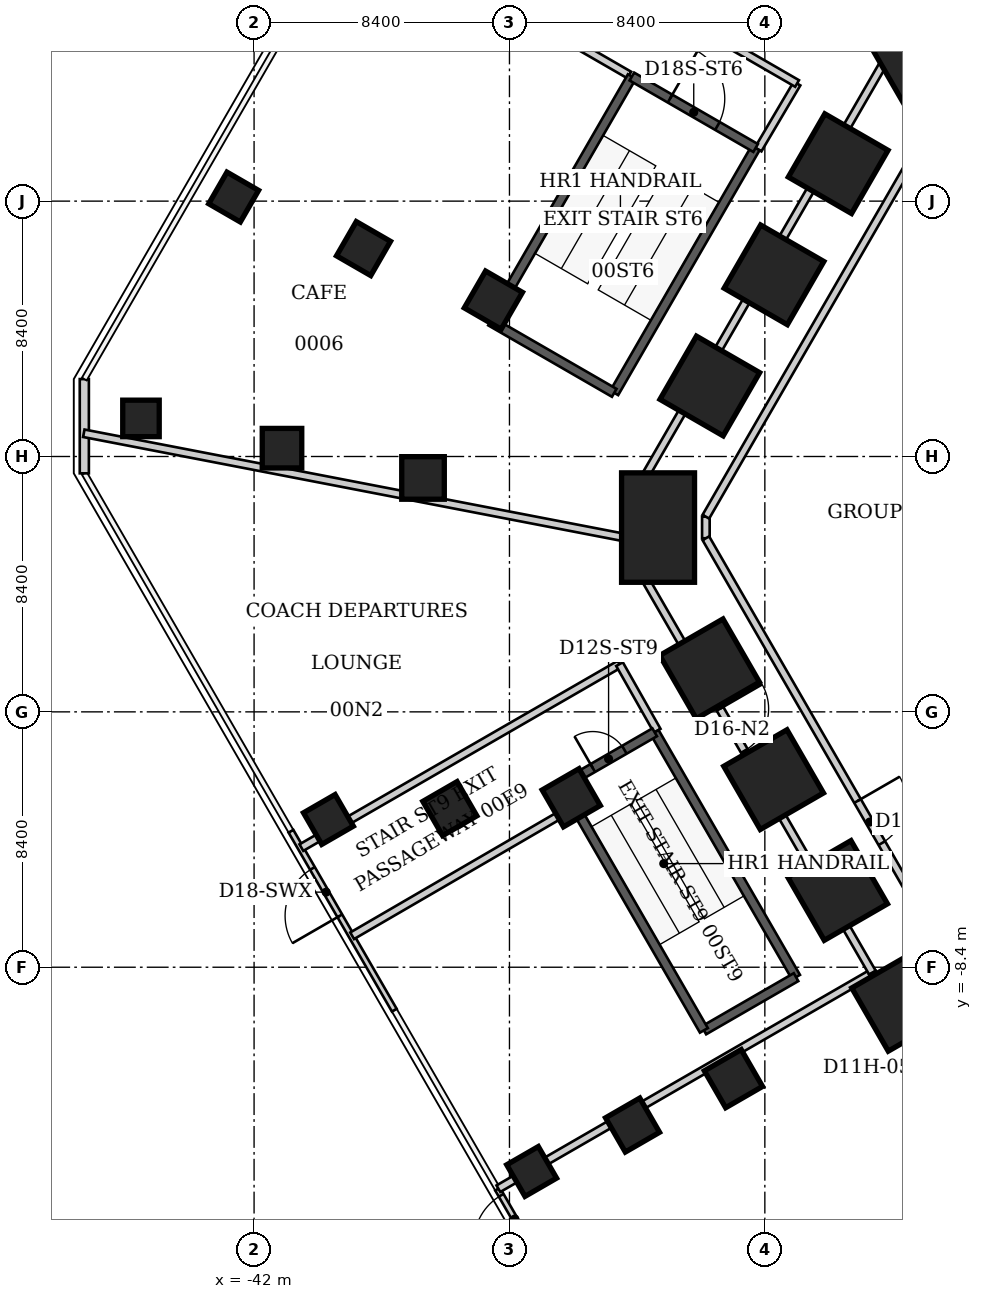
"""IFC4 building model, lengths in metres.
Left out: names, types, materials, properties, quantities, classifications, styles, units other than length and angle.
Written with IfcOpenShell. Run it as: python <this file> out.ifc"""

import sys

from ifc_helpers import new_model, si_unit, direction, frame, frame_2d, origin, origin_2d, place, context, subcontext, project, spatial, rectangle, extrude, element, fill, save


model = new_model("IFC4")
c1 = context("Model", 3, precision=1e-05, world=origin(), true_north=direction((0.0, 1.0)))
c2 = subcontext(c1, "Body", "Model", "MODEL_VIEW")
j1 = project(units=[si_unit("LENGTHUNIT", "METRE"), si_unit("PLANEANGLEUNIT", "RADIAN")], contexts=[c1])
p1 = place(None, origin())
s1 = spatial("IfcSite", under=j1, at=p1, CompositionType="ELEMENT")
p2 = place(p1, origin())
s2 = spatial("IfcBuilding", under=s1, at=p2, CompositionType="ELEMENT")
p3 = place(p2, origin())
s3 = spatial("IfcBuildingStorey", under=s2, at=p3, CompositionType="ELEMENT", Elevation=0.0)
for number, where, z_axis, x_axis in (
    (1, (-20.701, -9.521, -0.2), (0.0, 0.0, 1.0), (-0.866, -0.5, 0.0)),
    (2, (-22.806, -5.875, -0.2), (0.0, 0.0, 1.0), (-0.866, -0.5, 0.0)),
    (3, (-24.911, -2.23, -0.2), (0.0, 0.0, 1.0), (-0.866, -0.5, 0.0)),
    (4, (-27.016, 1.416, -0.2), (0.0, 0.0, 1.0), (-0.866, -0.5, 0.0)),
):
    element("IfcColumn", number, at=place(p3, frame(where, z_axis=z_axis, x_axis=x_axis)), inside=s3, PredefinedType="COLUMN", context=c2, shape_type="SweptSolid", body=[
        extrude(rectangle(XDim=2.4, YDim=2.4, at=origin_2d()), origin(), (0.0, 0.0, 1.0), 6.2),
    ])
p4 = place(p3, frame((-28.713, 6.062, -0.2), z_axis=(0.0, 0.0, 1.0), x_axis=(-1.0, 0.0, 0.0)))
e5 = element("IfcColumn", 5, at=p4, inside=s3, PredefinedType="COLUMN", context=c2, shape_type="SweptSolid", body=[
    extrude(rectangle(XDim=2.4, YDim=3.6, at=origin_2d()), origin(), (0.0, 0.0, 1.0), 6.2),
])
for number, where, z_axis, x_axis in (
    (6, (-27.01, 10.719, -0.2), (0.0, 0.0, 1.0), (-0.866, 0.5, 0.0)),
    (7, (-24.899, 14.375, -0.2), (0.0, 0.0, 1.0), (-0.866, 0.5, 0.0)),
    (8, (-22.788, 18.032, -0.2), (0.0, 0.0, 1.0), (-0.866, 0.5, 0.0)),
):
    element("IfcColumn", number, at=place(p3, frame(where, z_axis=z_axis, x_axis=x_axis)), inside=s3, PredefinedType="COLUMN", context=c2, shape_type="SweptSolid", body=[
        extrude(rectangle(XDim=2.4, YDim=2.4, at=origin_2d()), origin(), (0.0, 0.0, 1.0), 6.2),
    ])
p5 = place(p3, frame((-19.606, 21.835, -0.2), z_axis=(0.0, 0.0, 1.0), x_axis=(-0.5, 0.866025403784, 0.0)))
e9 = element("IfcColumn", 9, at=p5, inside=s3, PredefinedType="COLUMN", context=c2, shape_type="SweptSolid", body=[
    extrude(rectangle(XDim=2.4, YDim=3.6, at=origin_2d()), origin(), (0.0, 0.0, 1.0), 6.2),
])
for number, where, z_axis, x_axis in (
    (10, (-26.233, -12.065, -0.2), (0.0, 0.0, 1.0), (-0.866, -0.5, 0.0)),
    (11, (-31.567, -2.825, -0.2), (0.0, 0.0, 1.0), (-0.866, -0.5, 0.0)),
    (12, (-36.443, 7.694, -0.2), (0.0, 0.0, 1.0), (-1.0, 0.0, 0.0)),
    (13, (-34.129, 13.544, -0.2), (0.0, 0.0, 1.0), (-0.866, 0.5, 0.0)),
):
    element("IfcColumn", number, at=place(p3, frame(where, z_axis=z_axis, x_axis=x_axis)), inside=s3, PredefinedType="COLUMN", context=c2, shape_type="SweptSolid", body=[
        extrude(rectangle(XDim=1.4, YDim=1.4, at=origin_2d()), origin(), (0.0, 0.0, 1.0), 6.2),
    ])
for number, where, z_axis, x_axis in (
    (14, (-29.552, -13.592, -0.2), (0.0, 0.0, 1.0), (-0.866, -0.5, 0.0)),
    (15, (-35.561, -3.183, -0.2), (0.0, 0.0, 1.0), (-0.866, -0.5, 0.0)),
    (16, (-41.082, 8.674, -0.2), (0.0, 0.0, 1.0), (-1.0, 0.0, 0.0)),
    (17, (-38.4, 15.239, -0.2), (0.0, 0.0, 1.0), (-0.866, 0.5, 0.0)),
):
    element("IfcColumn", number, at=place(p3, frame(where, z_axis=z_axis, x_axis=x_axis)), inside=s3, PredefinedType="COLUMN", context=c2, shape_type="SweptSolid", body=[
        extrude(rectangle(XDim=1.3, YDim=1.3, at=origin_2d()), origin(), (0.0, 0.0, 1.0), 6.2),
    ])
for number, where, z_axis, x_axis in (
    (18, (-32.87, -15.118, -0.2), (0.0, 0.0, 1.0), (-0.866, -0.5, 0.0)),
    (19, (-39.555, -3.54, -0.2), (0.0, 0.0, 1.0), (-0.866, -0.5, 0.0)),
    (20, (-45.72, 9.653, -0.2), (0.0, 0.0, 1.0), (-1.0, 0.0, 0.0)),
    (21, (-42.672, 16.934, -0.2), (0.0, 0.0, 1.0), (-0.866, 0.5, 0.0)),
):
    element("IfcColumn", number, at=place(p3, frame(where, z_axis=z_axis, x_axis=x_axis)), inside=s3, PredefinedType="COLUMN", context=c2, shape_type="SweptSolid", body=[
        extrude(rectangle(XDim=1.2, YDim=1.2, at=origin_2d()), origin(), (0.0, 0.0, 1.0), 6.2),
    ])
p6 = place(p3, frame((-30.591, -21.586, 0.0), z_axis=(0.0, 0.0, 1.0), x_axis=(-0.500013675503, 0.866017508085, 0.0)))
e22 = element("IfcWall", 22, at=p6, inside=s3, PredefinedType="SOLIDWALL", context=c2, shape_type="SweptSolid", body=[
    extrude(rectangle(XDim=6.797, YDim=0.18, at=frame_2d((3.398, 0.0))), origin(), (0.0, 0.0, 1.0), 5.84),
])
p7 = place(p6, frame((0.233, 0.0, 0.0)))
e23 = element("IfcOpeningElement", 23, at=p7, cuts=e22, PredefinedType="OPENING", context=c2, shape_type="SweptSolid", body=[
    extrude(rectangle(XDim=1.8, YDim=2.7, at=frame_2d((0.9, 1.35))), frame((0.0, 0.09, 0.0), z_axis=(0.0, -1.0, 0.0), x_axis=(1.0, 0.0, 0.0)), (0.0, 0.0, 1.0), 0.18),
])
p8 = place(p6, frame((2.499, 0.0, 0.0)))
e24 = element("IfcOpeningElement", 24, at=p8, cuts=e22, PredefinedType="OPENING", context=c2, shape_type="SweptSolid", body=[
    extrude(rectangle(XDim=1.8, YDim=2.7, at=frame_2d((0.9, 1.35))), frame((0.0, 0.09, 0.0), z_axis=(0.0, -1.0, 0.0), x_axis=(1.0, 0.0, 0.0)), (0.0, 0.0, 1.0), 0.18),
])
p9 = place(p6, frame((4.764, 0.0, 0.0)))
e25 = element("IfcOpeningElement", 25, at=p9, cuts=e22, PredefinedType="OPENING", context=c2, shape_type="SweptSolid", body=[
    extrude(rectangle(XDim=1.8, YDim=2.7, at=frame_2d((0.9, 1.35))), frame((0.0, 0.09, 0.0), z_axis=(0.0, -1.0, 0.0), x_axis=(1.0, 0.0, 0.0)), (0.0, 0.0, 1.0), 0.18),
])
p10 = place(p3, frame((-37.388, -9.813, 0.0), z_axis=(0.0, 0.0, 1.0), x_axis=(-0.500013675503, 0.866017508085, 0.0)))
e26 = element("IfcWall", 26, at=p10, inside=s3, PredefinedType="SOLIDWALL", context=c2, shape_type="SweptSolid", body=[
    extrude(rectangle(XDim=6.797, YDim=0.18, at=frame_2d((3.398, 0.0))), origin(), (0.0, 0.0, 1.0), 5.84),
])
p11 = place(p10, frame((3.584, 0.0, 0.0)))
e27 = element("IfcOpeningElement", 27, at=p11, cuts=e26, PredefinedType="OPENING", context=c2, shape_type="SweptSolid", body=[
    extrude(rectangle(XDim=1.8, YDim=2.7, at=frame_2d((0.9, 1.35))), frame((0.0, 0.09, 0.0), z_axis=(0.0, -1.0, 0.0), x_axis=(1.0, 0.0, 0.0)), (0.0, 0.0, 1.0), 0.18),
])
p12 = place(p3, frame((-47.584, 7.846, 0.0), z_axis=(0.0, 0.0, 1.0), x_axis=(0.0, 1.0, 0.0)))
e28 = element("IfcWall", 28, at=p12, inside=s3, PredefinedType="SOLIDWALL", context=c2, shape_type="SweptSolid", body=[
    extrude(rectangle(XDim=3.1, YDim=0.3, at=frame_2d((1.55, 0.0))), origin(), (0.0, 0.0, 1.0), 5.84),
])
p13 = place(p3, frame((-38.774, -7.365, 0.0), z_axis=(0.0, 0.0, 1.0), x_axis=(0.864590905175, 0.502476433964, 0.0)))
e29 = element("IfcWall", 29, at=p13, inside=s3, PredefinedType="PARTITIONING", context=c2, shape_type="SweptSolid", body=[
    extrude(rectangle(XDim=8.309, YDim=0.25, at=frame_2d((4.154, 0.0))), origin(), (0.0, 0.0, 1.0), 5.75),
])
p14 = place(p3, frame((-33.964, -15.685, 0.0), z_axis=(0.0, 0.0, 1.0), x_axis=(0.865990423019, 0.500060583569, 0.0)))
e30 = element("IfcWall", 30, at=p14, inside=s3, PredefinedType="PARTITIONING", context=c2, shape_type="SweptSolid", body=[
    extrude(rectangle(XDim=14.208, YDim=0.25, at=frame_2d((7.104, 0.0))), origin(), (0.0, 0.0, 1.0), 4.993),
])
p15 = place(p3, frame((-29.98, 1.57, 0.0), z_axis=(0.0, 0.0, 1.0), x_axis=(-0.866251190484, -0.499608721886, 0.0)))
e31 = element("IfcWall", 31, at=p15, inside=s3, PredefinedType="PARTITIONING", context=c2, shape_type="SweptSolid", body=[
    extrude(rectangle(XDim=12.08, YDim=0.25, at=frame_2d((6.04, 0.0))), origin(), (0.0, 0.0, 1.0), 5.75),
])
p16 = place(p3, frame((-29.659, 20.948, 0.0), z_axis=(0.0, 0.0, 1.0), x_axis=(-0.865956906552, 0.500118621924, 0.0)))
e32 = element("IfcWall", 32, at=p16, inside=s3, PredefinedType="PARTITIONING", context=c2, shape_type="SweptSolid", body=[
    extrude(rectangle(XDim=10.491, YDim=0.25, at=frame_2d((5.245, 0.0))), origin(), (0.0, 0.0, 1.0), 5.75),
])
p17 = place(p3, frame((-29.54, 5.06, 0.0), z_axis=(0.0, 0.0, 1.0), x_axis=(0.500237574973, -0.865888196354, 0.0)))
e33 = element("IfcWall", 33, at=p17, inside=s3, PredefinedType="PARTITIONING", context=c2, shape_type="SweptSolid", body=[
    extrude(rectangle(XDim=15.753, YDim=0.25, at=frame_2d((7.876, 0.0))), origin(), (0.0, 0.0, 1.0), 4.04),
])
p18 = place(p17, frame((5.726, 0.0, 0.0)))
e34 = element("IfcOpeningElement", 34, at=p18, cuts=e33, PredefinedType="OPENING", context=c2, shape_type="SweptSolid", body=[
    extrude(rectangle(XDim=1.6, YDim=2.4, at=frame_2d((0.8, 1.2))), frame((0.0, 0.125, 0.0), z_axis=(0.0, -1.0, 0.0), x_axis=(1.0, 0.0, 0.0)), (0.0, 0.0, 1.0), 0.25),
])
p19 = place(p3, frame((-29.54, 5.645, 0.0), z_axis=(0.0, 0.0, 1.0), x_axis=(0.0, -1.0, 0.0)))
e35 = element("IfcWall", 35, at=p19, inside=s3, PredefinedType="PARTITIONING", context=c2, shape_type="SweptSolid", body=[
    extrude(rectangle(XDim=0.585, YDim=0.25, at=frame_2d((0.292, 0.0))), origin(), (0.0, 0.0, 1.0), 5.84),
])
p20 = place(p3, frame((-29.54, 5.68, 0.0), z_axis=(0.0, 0.0, 1.0), x_axis=(-0.981893421599, 0.189434180181, 0.0)))
e36 = element("IfcWall", 36, at=p20, inside=s3, PredefinedType="PARTITIONING", context=c2, shape_type="SweptSolid", body=[
    extrude(rectangle(XDim=18.394, YDim=0.25, at=frame_2d((9.197, 0.0))), origin(), (0.0, 0.0, 1.0), 5.75),
])
p21 = place(p3, frame((-29.54, 7.06, 0.0), z_axis=(0.0, 0.0, 1.0), x_axis=(0.0, -1.0, 0.0)))
e37 = element("IfcWall", 37, at=p21, inside=s3, PredefinedType="PARTITIONING", context=c2, shape_type="SweptSolid", body=[
    extrude(rectangle(XDim=1.38, YDim=0.25, at=frame_2d((0.69, 0.0))), origin(), (0.0, 0.0, 1.0), 5.84),
])
p22 = place(p3, frame((-28.74, -0.62, 0.0), z_axis=(0.0, 0.0, 1.0), x_axis=(-0.492718818431, 0.87018858069, 0.0)))
e38 = element("IfcWall", 38, at=p22, inside=s3, PredefinedType="PARTITIONING", context=c2, shape_type="SweptSolid", body=[
    extrude(rectangle(XDim=2.517, YDim=0.25, at=frame_2d((1.258, 0.0))), origin(), (0.0, 0.0, 1.0), 5.84),
])
p23 = place(p3, frame((-27.14, 5.71, 0.0), z_axis=(0.0, 0.0, 1.0), x_axis=(0.0, 1.0, 0.0)))
e39 = element("IfcWall", 39, at=p23, inside=s3, PredefinedType="PARTITIONING", context=c2, shape_type="SweptSolid", body=[
    extrude(rectangle(XDim=0.71, YDim=0.25, at=frame_2d((0.355, 0.0))), origin(), (0.0, 0.0, 1.0), 5.84),
])
p24 = place(p3, frame((-27.14, 5.71, 0.0), z_axis=(0.0, 0.0, 1.0), x_axis=(0.499871788402, -0.866099414132, 0.0)))
e40 = element("IfcWall", 40, at=p24, inside=s3, PredefinedType="PARTITIONING", context=c2, shape_type="SweptSolid", body=[
    extrude(rectangle(XDim=23.257, YDim=0.25, at=frame_2d((11.628, 0.0))), origin(), (0.0, 0.0, 1.0), 5.84),
])
p25 = place(p24, frame((9.979, 0.0, 0.0)))
e41 = element("IfcOpeningElement", 41, at=p25, cuts=e40, PredefinedType="OPENING", context=c2, shape_type="SweptSolid", body=[
    extrude(rectangle(XDim=1.6, YDim=2.4, at=frame_2d((0.8, 1.2))), frame((0.0, 0.125, 0.0), z_axis=(0.0, -1.0, 0.0), x_axis=(1.0, 0.0, 0.0)), (0.0, 0.0, 1.0), 0.25),
])
p26 = place(p3, frame((-27.14, 6.42, 0.0), z_axis=(0.0, 0.0, 1.0), x_axis=(0.50017078562, 0.865926778205, 0.0)))
e42 = element("IfcWall", 42, at=p26, inside=s3, PredefinedType="PARTITIONING", context=c2, shape_type="SweptSolid", body=[
    extrude(rectangle(XDim=15.995, YDim=0.25, at=frame_2d((7.997, 0.0))), origin(), (0.0, 0.0, 1.0), 5.84),
])
p27 = place(p3, frame((-25.42, 18.5, 0.0), z_axis=(0.0, 0.0, 1.0), x_axis=(0.508082727165, 0.861308273707, 0.0)))
e43 = element("IfcWall", 43, at=p27, inside=s3, PredefinedType="PARTITIONING", context=c2, shape_type="SweptSolid", body=[
    extrude(rectangle(XDim=2.519, YDim=0.25, at=frame_2d((1.26, 0.0))), origin(), (0.0, 0.0, 1.0), 5.84),
])
p28 = place(p3, frame((-24.14, 20.67, 0.0), z_axis=(0.0, 0.0, 1.0), x_axis=(-0.866003524369, 0.500037894345, 0.0)))
e44 = element("IfcWall", 44, at=p28, inside=s3, PredefinedType="PARTITIONING", context=c2, shape_type="SweptSolid", body=[
    extrude(rectangle(XDim=15.409, YDim=0.25, at=frame_2d((7.705, 0.0))), origin(), (0.0, 0.0, 1.0), 5.083),
])
p29 = place(p3, frame((-21.66, -8.58, 0.0), z_axis=(0.0, 0.0, 1.0), x_axis=(0.50046740921, -0.865755376719, 0.0)))
e45 = element("IfcWall", 45, at=p29, inside=s3, PredefinedType="PARTITIONING", context=c2, shape_type="SweptSolid", body=[
    extrude(rectangle(XDim=9.171, YDim=0.25, at=frame_2d((4.585, 0.0))), origin(), (0.0, 0.0, 1.0), 4.04),
])
p30 = place(p29, frame((3.086, 0.0, 0.0)))
e46 = element("IfcOpeningElement", 46, at=p30, cuts=e45, PredefinedType="OPENING", context=c2, shape_type="SweptSolid", body=[
    extrude(rectangle(XDim=1.1, YDim=2.2, at=frame_2d((0.55, 1.1))), frame((0.0, 0.125, 0.0), z_axis=(0.0, -1.0, 0.0), x_axis=(1.0, 0.0, 0.0)), (0.0, 0.0, 1.0), 0.25),
])
p31 = place(p3, frame((-20.88, 22.05, 0.0), z_axis=(0.0, 0.0, 1.0), x_axis=(-0.500246113481, -0.865883263464, 0.0)))
e47 = element("IfcWall", 47, at=p31, inside=s3, PredefinedType="PARTITIONING", context=c2, shape_type="SweptSolid", body=[
    extrude(rectangle(XDim=17.312, YDim=0.25, at=frame_2d((8.656, 0.0))), origin(), (0.0, 0.0, 1.0), 4.04),
])
p32 = place(p3, frame((-25.504, 18.548, 0.0), z_axis=(0.0, 0.0, 1.0), x_axis=(-0.500004225487, -0.866022964185, 0.0)))
e48 = element("IfcWall", 48, at=p32, inside=s3, PredefinedType="SHEAR", context=c2, shape_type="SweptSolid", body=[
    extrude(rectangle(XDim=9.3, YDim=0.3, at=frame_2d((4.65, 0.0))), origin(), (0.0, 0.0, 1.0), 6.0),
])
p33 = place(p3, frame((-30.154, 10.494, 0.0), z_axis=(0.0, 0.0, 1.0), x_axis=(-0.866016039709, 0.500016218704, 0.0)))
e49 = element("IfcWall", 49, at=p33, inside=s3, PredefinedType="SHEAR", context=c2, shape_type="SweptSolid", body=[
    extrude(rectangle(XDim=4.7, YDim=0.3, at=frame_2d((2.35, 0.0))), origin(), (0.0, 0.0, 1.0), 6.0),
])
p34 = place(p3, frame((-34.224, 12.844, 0.0), z_axis=(0.0, 0.0, 1.0), x_axis=(0.500015592816, 0.866016401081, 0.0)))
e50 = element("IfcWall", 50, at=p34, inside=s3, PredefinedType="SHEAR", context=c2, shape_type="SweptSolid", body=[
    extrude(rectangle(XDim=9.3, YDim=0.3, at=frame_2d((4.65, 0.0))), origin(), (0.0, 0.0, 1.0), 6.0),
])
p35 = place(p3, frame((-29.574, 20.898, 0.0), z_axis=(0.0, 0.0, 1.0), x_axis=(0.866038532462, -0.499977259774, 0.0)))
e51 = element("IfcWall", 51, at=p35, inside=s3, PredefinedType="SHEAR", context=c2, shape_type="SweptSolid", body=[
    extrude(rectangle(XDim=4.7, YDim=0.3, at=frame_2d((2.35, 0.0))), origin(), (0.0, 0.0, 1.0), 6.0),
])
p36 = place(p35, frame((1.45, 0.0, 0.0)))
e52 = element("IfcOpeningElement", 52, at=p36, cuts=e51, PredefinedType="OPENING", context=c2, shape_type="SweptSolid", body=[
    extrude(rectangle(XDim=1.8, YDim=2.4, at=frame_2d((0.9, 1.2))), frame((0.0, 0.15, 0.0), z_axis=(0.0, -1.0, 0.0), x_axis=(1.0, 0.0, 0.0)), (0.0, 0.0, 1.0), 0.3),
])
p37 = place(p3, frame((-28.824, -0.672, 0.0), z_axis=(0.0, 0.0, 1.0), x_axis=(0.499984536904, -0.866034331223, 0.0)))
e53 = element("IfcWall", 53, at=p37, inside=s3, PredefinedType="SHEAR", context=c2, shape_type="SweptSolid", body=[
    extrude(rectangle(XDim=9.3, YDim=0.3, at=frame_2d((4.65, 0.0))), origin(), (0.0, 0.0, 1.0), 6.0),
])
p38 = place(p3, frame((-24.174, -8.727, 0.0), z_axis=(0.0, 0.0, 1.0), x_axis=(-0.866019471182, -0.500010275428, 0.0)))
e54 = element("IfcWall", 54, at=p38, inside=s3, PredefinedType="SHEAR", context=c2, shape_type="SweptSolid", body=[
    extrude(rectangle(XDim=3.5, YDim=0.3, at=frame_2d((1.75, 0.0))), origin(), (0.0, 0.0, 1.0), 6.0),
])
p39 = place(p3, frame((-27.205, -10.477, 0.0), z_axis=(0.0, 0.0, 1.0), x_axis=(-0.499984536904, 0.866034331223, 0.0)))
e55 = element("IfcWall", 55, at=p39, inside=s3, PredefinedType="SHEAR", context=c2, shape_type="SweptSolid", body=[
    extrude(rectangle(XDim=9.3, YDim=0.3, at=frame_2d((4.65, 0.0))), origin(), (0.0, 0.0, 1.0), 6.0),
])
p40 = place(p3, frame((-31.855, -2.422, 0.0), z_axis=(0.0, 0.0, 1.0), x_axis=(0.866019471182, 0.500010275428, 0.0)))
e56 = element("IfcWall", 56, at=p40, inside=s3, PredefinedType="SHEAR", context=c2, shape_type="SweptSolid", body=[
    extrude(rectangle(XDim=3.5, YDim=0.3, at=frame_2d((1.75, 0.0))), origin(), (0.0, 0.0, 1.0), 6.0),
])
p41 = place(p40, frame((1.15, 0.0, 0.0)))
e57 = element("IfcOpeningElement", 57, at=p41, cuts=e56, PredefinedType="OPENING", context=c2, shape_type="SweptSolid", body=[
    extrude(rectangle(XDim=1.2, YDim=2.4, at=frame_2d((0.6, 1.2))), frame((0.0, 0.15, 0.0), z_axis=(0.0, -1.0, 0.0), x_axis=(1.0, 0.0, 0.0)), (0.0, 0.0, 1.0), 0.3),
])
p42 = place(p9, origin())
e58 = element("IfcDoor", 58, at=p42, inside=s3, OperationType="SINGLE_SWING_LEFT", PredefinedType="DOOR", context=c2, shape_type="SweptSolid", body=[
    extrude(rectangle(XDim=1.8, YDim=2.7, at=frame_2d((0.9, 1.35))), frame((0.0, 0.025, 0.0), z_axis=(0.0, -1.0, 0.0), x_axis=(1.0, 0.0, 0.0)), (0.0, 0.0, 1.0), 0.05),
])
fill(e25, e58)
p43 = place(p11, origin())
e59 = element("IfcDoor", 59, at=p43, inside=s3, OperationType="SINGLE_SWING_LEFT", PredefinedType="DOOR", context=c2, shape_type="SweptSolid", body=[
    extrude(rectangle(XDim=1.8, YDim=2.7, at=frame_2d((0.9, 1.35))), frame((0.0, 0.025, 0.0), z_axis=(0.0, -1.0, 0.0), x_axis=(1.0, 0.0, 0.0)), (0.0, 0.0, 1.0), 0.05),
])
fill(e27, e59)
p44 = place(p25, origin())
e60 = element("IfcDoor", 60, at=p44, inside=s3, OperationType="DOUBLE_DOOR_SINGLE_SWING", PredefinedType="DOOR", context=c2, shape_type="SweptSolid", body=[
    extrude(rectangle(XDim=1.6, YDim=2.4, at=frame_2d((0.8, 1.2))), frame((0.0, 0.025, 0.0), z_axis=(0.0, -1.0, 0.0), x_axis=(1.0, 0.0, 0.0)), (0.0, 0.0, 1.0), 0.05),
])
fill(e41, e60)
p45 = place(p18, origin())
e61 = element("IfcDoor", 61, at=p45, inside=s3, OperationType="DOUBLE_DOOR_SINGLE_SWING", PredefinedType="DOOR", context=c2, shape_type="SweptSolid", body=[
    extrude(rectangle(XDim=1.6, YDim=2.4, at=frame_2d((0.8, 1.2))), frame((0.0, 0.025, 0.0), z_axis=(0.0, -1.0, 0.0), x_axis=(1.0, 0.0, 0.0)), (0.0, 0.0, 1.0), 0.05),
])
fill(e34, e61)
p46 = place(p36, origin())
e62 = element("IfcDoor", 62, at=p46, inside=s3, OperationType="DOUBLE_DOOR_SINGLE_SWING", PredefinedType="DOOR", context=c2, shape_type="SweptSolid", body=[
    extrude(rectangle(XDim=1.8, YDim=2.4, at=frame_2d((0.9, 1.2))), frame((0.0, 0.025, 0.0), z_axis=(0.0, -1.0, 0.0), x_axis=(1.0, 0.0, 0.0)), (0.0, 0.0, 1.0), 0.05),
])
fill(e52, e62)
p47 = place(p41, origin())
e63 = element("IfcDoor", 63, at=p47, inside=s3, OperationType="SINGLE_SWING_LEFT", PredefinedType="DOOR", context=c2, shape_type="SweptSolid", body=[
    extrude(rectangle(XDim=1.2, YDim=2.4, at=frame_2d((0.6, 1.2))), frame((0.0, 0.025, 0.0), z_axis=(0.0, -1.0, 0.0), x_axis=(1.0, 0.0, 0.0)), (0.0, 0.0, 1.0), 0.05),
])
fill(e57, e63)
save(model, sys.argv[1])
